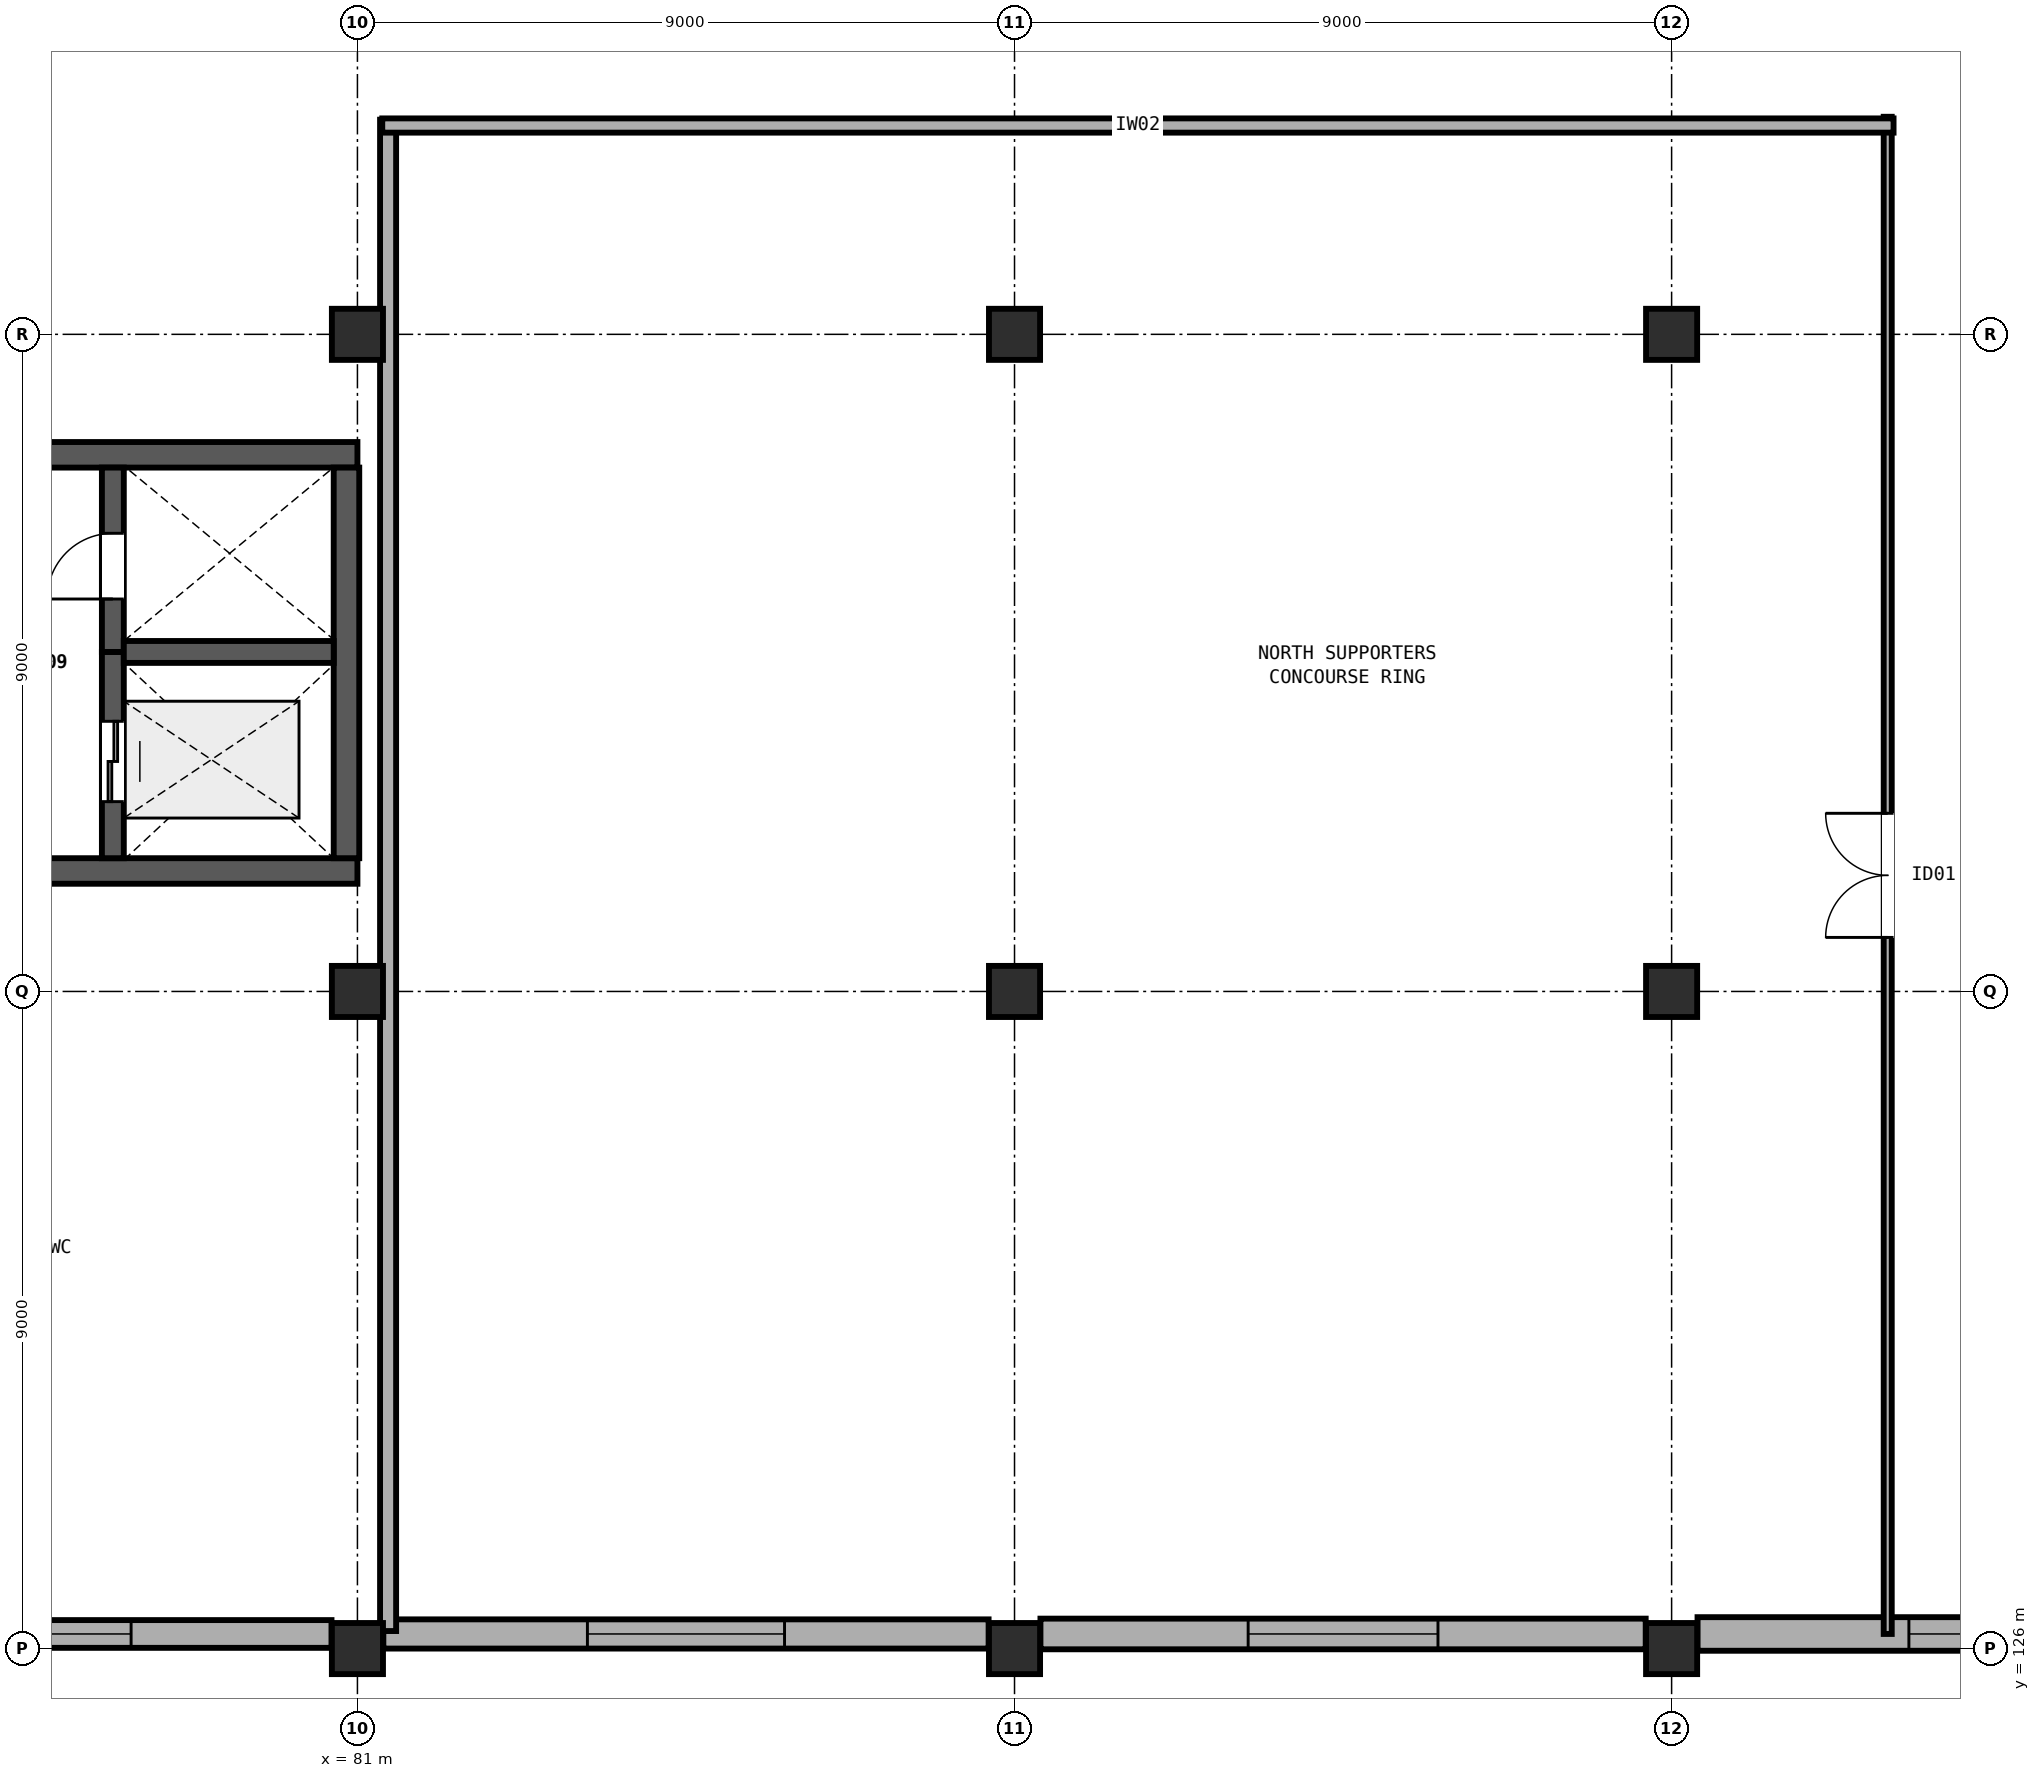
"""IFC4 building model, lengths in metres.
Left out: names, types, materials, properties, quantities, classifications, styles, units other than length and angle.
Written with IfcOpenShell. Run it as: python <this file> out.ifc"""

import sys

from ifc_helpers import new_model, si_unit, direction, frame, frame_2d, origin, origin_2d, place, context, subcontext, project, spatial, rectangle, extrude, element, fill, save


model = new_model("IFC4")
c1 = context("Model", 3, precision=1e-05, world=origin(), true_north=direction((0.0, 1.0)))
c2 = subcontext(c1, "Body", "Model", "MODEL_VIEW")
j1 = project(units=[si_unit("LENGTHUNIT", "METRE"), si_unit("PLANEANGLEUNIT", "RADIAN")], contexts=[c1])
p1 = place(None, origin())
s1 = spatial("IfcSite", under=j1, at=p1, CompositionType="ELEMENT")
p2 = place(p1, origin())
s2 = spatial("IfcBuilding", under=s1, at=p2, CompositionType="ELEMENT")
p3 = place(p2, frame((0.0, 0.0, 9.6)))
s3 = spatial("IfcBuildingStorey", under=s2, at=p3, CompositionType="ELEMENT", Elevation=9.6)
for number, where, z_axis, x_axis in (
    (1, (81.0, 126.0, 0.0), (0.0, 0.0, 1.0), (1.0, 0.0, 0.0)),
    (2, (81.0, 135.0, 0.0), (0.0, 0.0, 1.0), (1.0, 0.0, 0.0)),
    (3, (81.0, 144.0, 0.0), (0.0, 0.0, 1.0), (1.0, 0.0, 0.0)),
    (4, (90.0, 126.0, 0.0), (0.0, 0.0, 1.0), (1.0, 0.0, 0.0)),
    (5, (90.0, 135.0, 0.0), (0.0, 0.0, 1.0), (1.0, 0.0, 0.0)),
    (6, (90.0, 144.0, 0.0), (0.0, 0.0, 1.0), (1.0, 0.0, 0.0)),
    (7, (99.0, 126.0, 0.0), (0.0, 0.0, 1.0), (1.0, 0.0, 0.0)),
    (8, (99.0, 135.0, 0.0), (0.0, 0.0, 1.0), (1.0, 0.0, 0.0)),
    (9, (99.0, 144.0, 0.0), (0.0, 0.0, 1.0), (1.0, 0.0, 0.0)),
):
    element("IfcColumn", number, at=place(p3, frame(where, z_axis=z_axis, x_axis=x_axis)), inside=s3, PredefinedType="COLUMN", context=c2, shape_type="SweptSolid", body=[
        extrude(rectangle(XDim=0.7, YDim=0.7, at=origin_2d()), origin(), (0.0, 0.0, 1.0), 4.8),
    ])
p4 = place(p3, frame((63.0, 136.65, 0.0), z_axis=(0.0, 0.0, 1.0), x_axis=(1.0, 0.0, 0.0)))
e10 = element("IfcWall", 10, at=p4, inside=s3, PredefinedType="SHEAR", context=c2, shape_type="SweptSolid", body=[
    extrude(rectangle(XDim=18.0, YDim=0.35, at=frame_2d((9.0, 0.0))), origin(), (0.0, 0.0, 1.0), 4.5),
])
p5 = place(p3, frame((81.0, 142.35, 0.0), z_axis=(0.0, 0.0, 1.0), x_axis=(-1.0, 0.0, 0.0)))
e11 = element("IfcWall", 11, at=p5, inside=s3, PredefinedType="SHEAR", context=c2, shape_type="SweptSolid", body=[
    extrude(rectangle(XDim=18.0, YDim=0.35, at=frame_2d((9.0, 0.0))), origin(), (0.0, 0.0, 1.0), 4.5),
])
p6 = place(p5, frame((4.7, 0.0, 0.0)))
e12 = element("IfcOpeningElement", 12, at=p6, cuts=e11, PredefinedType="OPENING", context=c2, shape_type="SweptSolid", body=[
    extrude(rectangle(XDim=1.9, YDim=2.25, at=frame_2d((0.95, 1.125))), frame((0.0, 0.185, 0.0), z_axis=(0.0, -1.0, 0.0), x_axis=(1.0, 0.0, 0.0)), (0.0, 0.0, 1.0), 0.37),
])
p7 = place(p3, frame((80.85, 136.825, 0.0), z_axis=(0.0, 0.0, 1.0), x_axis=(0.0, 1.0, 0.0)))
e13 = element("IfcWall", 13, at=p7, inside=s3, PredefinedType="SHEAR", context=c2, shape_type="SweptSolid", body=[
    extrude(rectangle(XDim=5.35, YDim=0.35, at=frame_2d((2.675, 0.0))), origin(), (0.0, 0.0, 1.0), 4.5),
])
p8 = place(p3, frame((77.65, 136.825, 0.0), z_axis=(0.0, 0.0, 1.0), x_axis=(0.0, 1.0, 0.0)))
e14 = element("IfcWall", 14, at=p8, inside=s3, PredefinedType="SHEAR", context=c2, shape_type="SweptSolid", body=[
    extrude(rectangle(XDim=2.825, YDim=0.3, at=frame_2d((1.413, 0.0))), origin(), (0.0, 0.0, 1.0), 4.5),
])
p9 = place(p8, frame((0.775, 0.0, 0.0)))
e15 = element("IfcOpeningElement", 15, at=p9, cuts=e14, PredefinedType="OPENING", context=c2, shape_type="SweptSolid", body=[
    extrude(rectangle(XDim=1.1, YDim=2.1, at=frame_2d((0.55, 1.05))), frame((0.0, 0.16, 0.0), z_axis=(0.0, -1.0, 0.0), x_axis=(1.0, 0.0, 0.0)), (0.0, 0.0, 1.0), 0.32),
])
p10 = place(p3, frame((77.65, 139.65, 0.0), z_axis=(0.0, 0.0, 1.0), x_axis=(0.0, 1.0, 0.0)))
e16 = element("IfcWall", 16, at=p10, inside=s3, PredefinedType="SHEAR", context=c2, shape_type="SweptSolid", body=[
    extrude(rectangle(XDim=2.525, YDim=0.3, at=frame_2d((1.263, 0.0))), origin(), (0.0, 0.0, 1.0), 4.5),
])
p11 = place(p10, frame((0.725, 0.0, 0.0)))
e17 = element("IfcOpeningElement", 17, at=p11, cuts=e16, PredefinedType="OPENING", context=c2, shape_type="SweptSolid", body=[
    extrude(rectangle(XDim=0.9, YDim=2.1, at=frame_2d((0.45, 1.05))), frame((0.0, 0.16, 0.0), z_axis=(0.0, -1.0, 0.0), x_axis=(1.0, 0.0, 0.0)), (0.0, 0.0, 1.0), 0.32),
])
p12 = place(p3, frame((77.8, 139.65, 0.0), z_axis=(0.0, 0.0, 1.0), x_axis=(1.0, 0.0, 0.0)))
e18 = element("IfcWall", 18, at=p12, inside=s3, PredefinedType="SHEAR", context=c2, shape_type="SweptSolid", body=[
    extrude(rectangle(XDim=2.875, YDim=0.3, at=frame_2d((1.438, 0.0))), origin(), (0.0, 0.0, 1.0), 4.5),
])
p13 = place(p3, frame((107.645, 126.2, 0.0), z_axis=(0.0, 0.0, 1.0), x_axis=(-1.0, 0.0, 0.0)))
e19 = element("IfcWall", 19, at=p13, inside=s3, PredefinedType="SOLIDWALL", context=c2, shape_type="SweptSolid", body=[
    extrude(rectangle(XDim=8.29, YDim=0.46, at=frame_2d((4.145, 0.0))), origin(), (0.0, 0.0, 1.0), 3.58),
])
p14 = place(p13, frame((2.895, 0.0, 0.9)))
e20 = element("IfcOpeningElement", 20, at=p14, cuts=e19, PredefinedType="OPENING", context=c2, shape_type="SweptSolid", body=[
    extrude(rectangle(XDim=2.5, YDim=2.1, at=frame_2d((1.25, 1.05))), frame((0.0, 0.24, 0.0), z_axis=(0.0, -1.0, 0.0), x_axis=(1.0, 0.0, 0.0)), (0.0, 0.0, 1.0), 0.48),
])
p15 = place(p3, frame((98.645, 126.2, 0.0), z_axis=(0.0, 0.0, 1.0), x_axis=(-1.0, 0.0, 0.0)))
e21 = element("IfcWall", 21, at=p15, inside=s3, PredefinedType="SOLIDWALL", context=c2, shape_type="SweptSolid", body=[
    extrude(rectangle(XDim=8.29, YDim=0.42, at=frame_2d((4.145, 0.0))), origin(), (0.0, 0.0, 1.0), 3.58),
])
p16 = place(p15, frame((2.845, 0.0, 0.9)))
e22 = element("IfcOpeningElement", 22, at=p16, cuts=e21, PredefinedType="OPENING", context=c2, shape_type="SweptSolid", body=[
    extrude(rectangle(XDim=2.6, YDim=2.15, at=frame_2d((1.3, 1.075))), frame((0.0, 0.22, 0.0), z_axis=(0.0, -1.0, 0.0), x_axis=(1.0, 0.0, 0.0)), (0.0, 0.0, 1.0), 0.44),
])
p17 = place(p3, frame((89.645, 126.2, 0.0), z_axis=(0.0, 0.0, 1.0), x_axis=(-1.0, 0.0, 0.0)))
e23 = element("IfcWall", 23, at=p17, inside=s3, PredefinedType="SOLIDWALL", context=c2, shape_type="SweptSolid", body=[
    extrude(rectangle(XDim=8.29, YDim=0.4, at=frame_2d((4.145, 0.0))), origin(), (0.0, 0.0, 1.0), 3.58),
])
p18 = place(p17, frame((2.795, 0.0, 0.9)))
e24 = element("IfcOpeningElement", 24, at=p18, cuts=e23, PredefinedType="OPENING", context=c2, shape_type="SweptSolid", body=[
    extrude(rectangle(XDim=2.7, YDim=2.15, at=frame_2d((1.35, 1.075))), frame((0.0, 0.21, 0.0), z_axis=(0.0, -1.0, 0.0), x_axis=(1.0, 0.0, 0.0)), (0.0, 0.0, 1.0), 0.42),
])
p19 = place(p3, frame((80.645, 126.2, 0.0), z_axis=(0.0, 0.0, 1.0), x_axis=(-1.0, 0.0, 0.0)))
e25 = element("IfcWall", 25, at=p19, inside=s3, PredefinedType="SOLIDWALL", context=c2, shape_type="SweptSolid", body=[
    extrude(rectangle(XDim=8.29, YDim=0.38, at=frame_2d((4.145, 0.0))), origin(), (0.0, 0.0, 1.0), 3.58),
])
p20 = place(p19, frame((2.745, 0.0, 0.9)))
e26 = element("IfcOpeningElement", 26, at=p20, cuts=e25, PredefinedType="OPENING", context=c2, shape_type="SweptSolid", body=[
    extrude(rectangle(XDim=2.8, YDim=2.2, at=frame_2d((1.4, 1.1))), frame((0.0, 0.2, 0.0), z_axis=(0.0, -1.0, 0.0), x_axis=(1.0, 0.0, 0.0)), (0.0, 0.0, 1.0), 0.4),
])
p21 = place(p3, frame((101.96, 126.2, 0.0), z_axis=(0.0, 0.0, 1.0), x_axis=(0.0, 1.0, 0.0)))
e27 = element("IfcWall", 27, at=p21, inside=s3, PredefinedType="PARTITIONING", context=c2, shape_type="SweptSolid", body=[
    extrude(rectangle(XDim=20.78, YDim=0.11, at=frame_2d((10.39, 0.0))), origin(), (0.0, 0.0, 1.0), 3.56),
])
p22 = place(p21, frame((9.54, 0.0, 0.0)))
e28 = element("IfcOpeningElement", 28, at=p22, cuts=e27, PredefinedType="OPENING", context=c2, shape_type="SweptSolid", body=[
    extrude(rectangle(XDim=1.7, YDim=2.2, at=frame_2d((0.85, 1.1))), frame((0.0, 0.065, 0.0), z_axis=(0.0, -1.0, 0.0), x_axis=(1.0, 0.0, 0.0)), (0.0, 0.0, 1.0), 0.13),
])
p23 = place(p3, frame((81.42, 126.24, 0.0), z_axis=(0.0, 0.0, 1.0), x_axis=(0.0, 1.0, 0.0)))
e29 = element("IfcWall", 29, at=p23, inside=s3, PredefinedType="PARTITIONING", context=c2, shape_type="SweptSolid", body=[
    extrude(rectangle(XDim=20.7, YDim=0.22, at=frame_2d((10.35, 0.0))), origin(), (0.0, 0.0, 1.0), 3.56),
])
p24 = place(p3, frame((81.34, 146.86, 0.0), z_axis=(0.0, 0.0, 1.0), x_axis=(1.0, 0.0, 0.0)))
e30 = element("IfcWall", 30, at=p24, inside=s3, PredefinedType="PARTITIONING", context=c2, shape_type="SweptSolid", body=[
    extrude(rectangle(XDim=20.7, YDim=0.195, at=frame_2d((10.35, 0.0))), origin(), (0.0, 0.0, 1.0), 3.56),
])
p25 = place(p14, origin())
e31 = element("IfcWindow", 31, at=p25, inside=s3, PartitioningType="DOUBLE_PANEL_VERTICAL", PredefinedType="WINDOW", context=c2, shape_type="SweptSolid", body=[
    extrude(rectangle(XDim=2.5, YDim=2.1, at=frame_2d((1.25, 1.05))), frame((0.0, 0.03, 0.0), z_axis=(0.0, -1.0, 0.0), x_axis=(1.0, 0.0, 0.0)), (0.0, 0.0, 1.0), 0.06),
])
fill(e20, e31)
p26 = place(p16, origin())
e32 = element("IfcWindow", 32, at=p26, inside=s3, PartitioningType="DOUBLE_PANEL_VERTICAL", PredefinedType="WINDOW", context=c2, shape_type="SweptSolid", body=[
    extrude(rectangle(XDim=2.6, YDim=2.15, at=frame_2d((1.3, 1.075))), frame((0.0, 0.03, 0.0), z_axis=(0.0, -1.0, 0.0), x_axis=(1.0, 0.0, 0.0)), (0.0, 0.0, 1.0), 0.06),
])
fill(e22, e32)
p27 = place(p18, origin())
e33 = element("IfcWindow", 33, at=p27, inside=s3, PartitioningType="DOUBLE_PANEL_VERTICAL", PredefinedType="WINDOW", context=c2, shape_type="SweptSolid", body=[
    extrude(rectangle(XDim=2.7, YDim=2.15, at=frame_2d((1.35, 1.075))), frame((0.0, 0.03, 0.0), z_axis=(0.0, -1.0, 0.0), x_axis=(1.0, 0.0, 0.0)), (0.0, 0.0, 1.0), 0.06),
])
fill(e24, e33)
p28 = place(p20, origin())
e34 = element("IfcWindow", 34, at=p28, inside=s3, PartitioningType="DOUBLE_PANEL_VERTICAL", PredefinedType="WINDOW", context=c2, shape_type="SweptSolid", body=[
    extrude(rectangle(XDim=2.8, YDim=2.2, at=frame_2d((1.4, 1.1))), frame((0.0, 0.03, 0.0), z_axis=(0.0, -1.0, 0.0), x_axis=(1.0, 0.0, 0.0)), (0.0, 0.0, 1.0), 0.06),
])
fill(e26, e34)
p29 = place(p11, origin())
e35 = element("IfcDoor", 35, at=p29, inside=s3, OperationType="SINGLE_SWING_LEFT", PredefinedType="DOOR", context=c2, shape_type="SweptSolid", body=[
    extrude(rectangle(XDim=0.9, YDim=2.1, at=frame_2d((0.45, 1.05))), frame((0.0, 0.025, 0.0), z_axis=(0.0, -1.0, 0.0), x_axis=(1.0, 0.0, 0.0)), (0.0, 0.0, 1.0), 0.05),
])
fill(e17, e35)
p30 = place(p9, origin())
e36 = element("IfcDoor", 36, at=p30, inside=s3, OperationType="DOUBLE_DOOR_SLIDING", PredefinedType="DOOR", context=c2, shape_type="SweptSolid", body=[
    extrude(rectangle(XDim=1.1, YDim=2.1, at=frame_2d((0.55, 1.05))), frame((0.0, 0.025, 0.0), z_axis=(0.0, -1.0, 0.0), x_axis=(1.0, 0.0, 0.0)), (0.0, 0.0, 1.0), 0.05),
])
fill(e15, e36)
p31 = place(p22, origin())
e37 = element("IfcDoor", 37, at=p31, inside=s3, OperationType="DOUBLE_DOOR_SINGLE_SWING", PredefinedType="DOOR", context=c2, shape_type="SweptSolid", body=[
    extrude(rectangle(XDim=1.7, YDim=2.2, at=frame_2d((0.85, 1.1))), frame((0.0, 0.025, 0.0), z_axis=(0.0, -1.0, 0.0), x_axis=(1.0, 0.0, 0.0)), (0.0, 0.0, 1.0), 0.05),
])
fill(e28, e37)
save(model, sys.argv[1])
